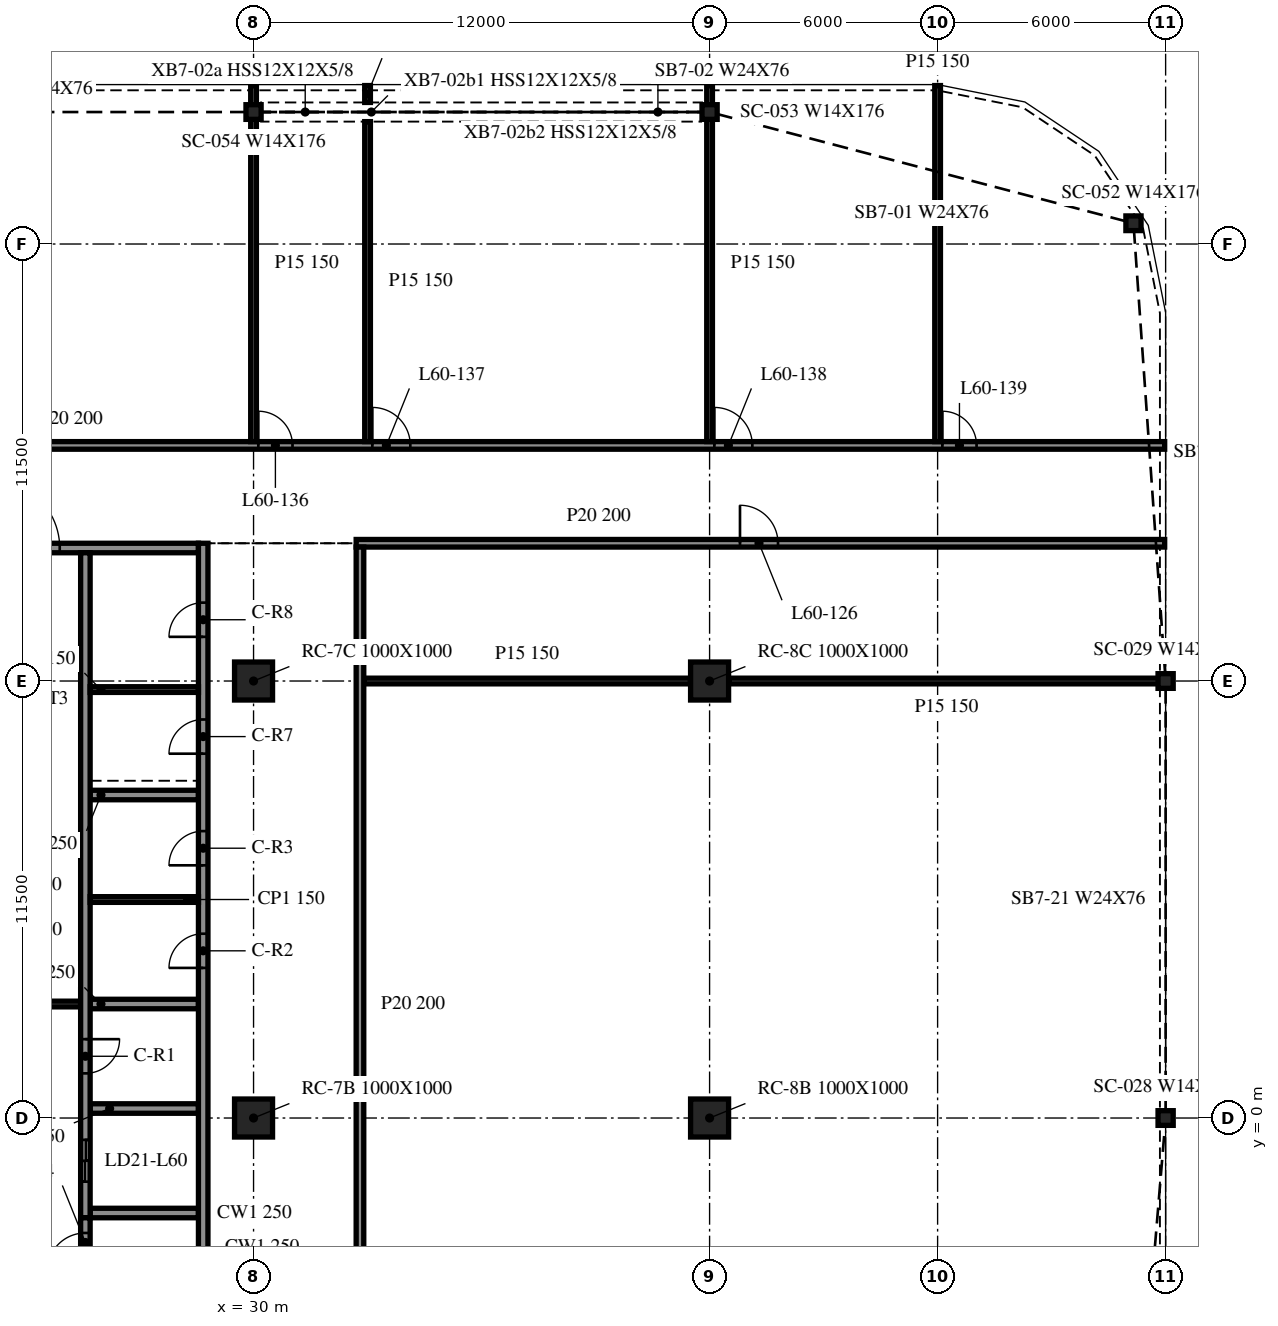
"""IFC4 building model, lengths in metres.
Left out: names, types, materials, properties, quantities, classifications, styles, units other than length and angle.
Written with IfcOpenShell. Run it as: python <this file> out.ifc"""

import sys

from ifc_helpers import new_model, si_unit, direction, frame, frame_2d, origin, origin_2d, place, context, subcontext, project, spatial, rectangle, i_section, extrude, element, fill, save


model = new_model("IFC4")
c1 = context("Model", 3, precision=1e-05, world=origin(), true_north=direction((0.0, 1.0)))
c2 = subcontext(c1, "Body", "Model", "MODEL_VIEW")
j1 = project(units=[si_unit("LENGTHUNIT", "METRE"), si_unit("PLANEANGLEUNIT", "RADIAN")], contexts=[c1])
p1 = place(None, origin())
s1 = spatial("IfcSite", under=j1, at=p1, CompositionType="ELEMENT")
p2 = place(p1, origin())
s2 = spatial("IfcBuilding", under=s1, at=p2, CompositionType="ELEMENT")
p3 = place(p2, frame((0.0, 0.0, 247.6)))
s3 = spatial("IfcBuildingStorey", under=s2, at=p3, CompositionType="ELEMENT", Elevation=247.6)
for number, where, z_axis, x_axis in (
    (1, (30.0, 0.0, -0.34), (0.0, 0.0, 1.0), (1.0, 0.0, 0.0)),
    (2, (30.0, 11.5, -0.34), (0.0, 0.0, 1.0), (1.0, 0.0, 0.0)),
    (3, (42.0, 0.0, -0.34), (0.0, 0.0, 1.0), (1.0, 0.0, 0.0)),
    (4, (42.0, 11.5, -0.34), (0.0, 0.0, 1.0), (1.0, 0.0, 0.0)),
):
    element("IfcColumn", number, at=place(p3, frame(where, z_axis=z_axis, x_axis=x_axis)), inside=s3, PredefinedType="COLUMN", context=c2, shape_type="SweptSolid", body=[
        extrude(rectangle(XDim=1.0, YDim=1.0, at=origin_2d()), origin(), (0.0, 0.0, 1.0), 3.8),
    ])
for number, where, z_axis, x_axis in (
    (5, (53.154, 23.546, -0.34), (0.0, 0.0, 1.0), (1.0, 0.0, 0.0)),
    (6, (42.0, 26.473, -0.34), (0.0, 0.0, 1.0), (1.0, 0.0, 0.0)),
    (7, (30.0, 26.473, -0.34), (0.0, 0.0, 1.0), (1.0, 0.0, 0.0)),
    (8, (54.0, 0.0, -0.34), (0.0, 0.0, 1.0), (1.0, 0.0, 0.0)),
    (9, (54.0, 11.5, -0.34), (0.0, 0.0, 1.0), (1.0, 0.0, 0.0)),
):
    element("IfcColumn", number, at=place(p3, frame(where, z_axis=z_axis, x_axis=x_axis)), inside=s3, PredefinedType="COLUMN", context=c2, shape_type="SweptSolid", body=[
        extrude(i_section(OverallWidth=0.399, OverallDepth=0.386, WebThickness=0.021, FlangeThickness=0.033, at=origin_2d()), origin(), (0.0, 0.0, 1.0), 3.8),
    ])
p4 = place(p3, frame((28.675, -9.125, 0.0), z_axis=(0.0, 0.0, 1.0), x_axis=(0.0, 1.0, 0.0)))
e10 = element("IfcWall", 10, at=p4, inside=s3, PredefinedType="SOLIDWALL", context=c2, shape_type="SweptSolid", body=[
    extrude(rectangle(XDim=24.25, YDim=0.25, at=frame_2d((12.125, 0.0))), origin(), (0.0, 0.0, 1.0), 3.46),
])
p5 = place(p4, frame((13.075, 0.0, 0.0)))
e11 = element("IfcOpeningElement", 11, at=p5, cuts=e10, PredefinedType="OPENING", context=c2, shape_type="SweptSolid", body=[
    extrude(rectangle(XDim=0.9, YDim=2.1, at=frame_2d((0.45, 1.05))), frame((0.0, 0.135, 0.0), z_axis=(0.0, -1.0, 0.0), x_axis=(1.0, 0.0, 0.0)), (0.0, 0.0, 1.0), 0.27),
])
p6 = place(p4, frame((15.775, 0.0, 0.0)))
e12 = element("IfcOpeningElement", 12, at=p6, cuts=e10, PredefinedType="OPENING", context=c2, shape_type="SweptSolid", body=[
    extrude(rectangle(XDim=0.9, YDim=2.1, at=frame_2d((0.45, 1.05))), frame((0.0, 0.135, 0.0), z_axis=(0.0, -1.0, 0.0), x_axis=(1.0, 0.0, 0.0)), (0.0, 0.0, 1.0), 0.27),
])
p7 = place(p4, frame((18.712, 0.0, 0.0)))
e13 = element("IfcOpeningElement", 13, at=p7, cuts=e10, PredefinedType="OPENING", context=c2, shape_type="SweptSolid", body=[
    extrude(rectangle(XDim=0.9, YDim=2.1, at=frame_2d((0.45, 1.05))), frame((0.0, 0.135, 0.0), z_axis=(0.0, -1.0, 0.0), x_axis=(1.0, 0.0, 0.0)), (0.0, 0.0, 1.0), 0.27),
])
p8 = place(p4, frame((21.788, 0.0, 0.0)))
e14 = element("IfcOpeningElement", 14, at=p8, cuts=e10, PredefinedType="OPENING", context=c2, shape_type="SweptSolid", body=[
    extrude(rectangle(XDim=0.9, YDim=2.1, at=frame_2d((0.45, 1.05))), frame((0.0, 0.135, 0.0), z_axis=(0.0, -1.0, 0.0), x_axis=(1.0, 0.0, 0.0)), (0.0, 0.0, 1.0), 0.27),
])
p9 = place(p3, frame((19.45, 15.0, 0.0), z_axis=(0.0, 0.0, 1.0), x_axis=(1.0, 0.0, 0.0)))
e15 = element("IfcWall", 15, at=p9, inside=s3, PredefinedType="SOLIDWALL", context=c2, shape_type="SweptSolid", body=[
    extrude(rectangle(XDim=9.1, YDim=0.25, at=frame_2d((4.55, 0.0))), origin(), (0.0, 0.0, 1.0), 3.46),
])
p10 = place(p9, frame((3.65, 0.0, 0.0)))
e16 = element("IfcOpeningElement", 16, at=p10, cuts=e15, PredefinedType="OPENING", context=c2, shape_type="SweptSolid", body=[
    extrude(rectangle(XDim=1.8, YDim=2.1, at=frame_2d((0.9, 1.05))), frame((0.0, 0.135, 0.0), z_axis=(0.0, -1.0, 0.0), x_axis=(1.0, 0.0, 0.0)), (0.0, 0.0, 1.0), 0.27),
])
p11 = place(p3, frame((25.575, -8.875, 0.0), z_axis=(0.0, 0.0, 1.0), x_axis=(0.0, 1.0, 0.0)))
e17 = element("IfcWall", 17, at=p11, inside=s3, PredefinedType="SOLIDWALL", context=c2, shape_type="SweptSolid", body=[
    extrude(rectangle(XDim=6.25, YDim=0.25, at=frame_2d((3.125, 0.0))), origin(), (0.0, 0.0, 1.0), 3.46),
])
p12 = place(p11, frame((4.85, 0.0, 0.0)))
e18 = element("IfcOpeningElement", 18, at=p12, cuts=e17, PredefinedType="OPENING", context=c2, shape_type="SweptSolid", body=[
    extrude(rectangle(XDim=1.0, YDim=2.1, at=frame_2d((0.5, 1.05))), frame((0.0, 0.135, 0.0), z_axis=(0.0, -1.0, 0.0), x_axis=(1.0, 0.0, 0.0)), (0.0, 0.0, 1.0), 0.27),
])
p13 = place(p3, frame((25.575, 14.875, 0.0), z_axis=(0.0, 0.0, 1.0), x_axis=(0.0, -1.0, 0.0)))
e19 = element("IfcWall", 19, at=p13, inside=s3, PredefinedType="SOLIDWALL", context=c2, shape_type="SweptSolid", body=[
    extrude(rectangle(XDim=17.5, YDim=0.25, at=frame_2d((8.75, 0.0))), origin(), (0.0, 0.0, 1.0), 3.46),
])
p14 = place(p13, frame((15.45, 0.0, 0.0)))
e20 = element("IfcOpeningElement", 20, at=p14, cuts=e19, PredefinedType="OPENING", context=c2, shape_type="SweptSolid", body=[
    extrude(rectangle(XDim=1.1, YDim=2.1, at=frame_2d((0.55, 1.05))), frame((0.0, 0.135, 0.0), z_axis=(0.0, -1.0, 0.0), x_axis=(1.0, 0.0, 0.0)), (0.0, 0.0, 1.0), 0.27),
])
p15 = place(p13, frame((12.8, 0.0, 0.0)))
e21 = element("IfcOpeningElement", 21, at=p15, cuts=e19, PredefinedType="OPENING", context=c2, shape_type="SweptSolid", body=[
    extrude(rectangle(XDim=0.9, YDim=2.1, at=frame_2d((0.45, 1.05))), frame((0.0, 0.135, 0.0), z_axis=(0.0, -1.0, 0.0), x_axis=(1.0, 0.0, 0.0)), (0.0, 0.0, 1.0), 0.27),
])
for number, where, z_axis, x_axis in (
    (22, (25.7, -2.5, 0.0), (0.0, 0.0, 1.0), (1.0, 0.0, 0.0)),
    (23, (25.7, 0.25, 0.0), (0.0, 0.0, 1.0), (1.0, 0.0, 0.0)),
    (24, (25.7, 3.0, 0.0), (0.0, 0.0, 1.0), (1.0, 0.0, 0.0)),
    (25, (25.7, 8.5, 0.0), (0.0, 0.0, 1.0), (1.0, 0.0, 0.0)),
):
    element("IfcWall", number, at=place(p3, frame(where, z_axis=z_axis, x_axis=x_axis)), inside=s3, PredefinedType="SOLIDWALL", context=c2, shape_type="SweptSolid", body=[
        extrude(rectangle(XDim=2.85, YDim=0.25, at=frame_2d((1.425, 0.0))), origin(), (0.0, 0.0, 1.0), 3.46),
    ])
p16 = place(p3, frame((22.55, 3.0, 0.0), z_axis=(0.0, 0.0, 1.0), x_axis=(1.0, 0.0, 0.0)))
e26 = element("IfcWall", 26, at=p16, inside=s3, PredefinedType="PARTITIONING", context=c2, shape_type="SweptSolid", body=[
    extrude(rectangle(XDim=2.9, YDim=0.15, at=frame_2d((1.45, 0.0))), origin(), (0.0, 0.0, 1.0), 3.46),
])
for number, where, z_axis, x_axis in (
    (27, (25.7, 5.75, 0.0), (0.0, 0.0, 1.0), (1.0, 0.0, 0.0)),
    (28, (25.7, 11.275, 0.0), (0.0, 0.0, 1.0), (1.0, 0.0, 0.0)),
):
    element("IfcWall", number, at=place(p3, frame(where, z_axis=z_axis, x_axis=x_axis)), inside=s3, PredefinedType="PARTITIONING", context=c2, shape_type="SweptSolid", body=[
        extrude(rectangle(XDim=2.85, YDim=0.15, at=frame_2d((1.425, 0.0))), origin(), (0.0, 0.0, 1.0), 3.46),
    ])
p17 = place(p3, frame((32.9, 11.5, 0.0), z_axis=(0.0, 0.0, 1.0), x_axis=(1.0, 0.0, 0.0)))
e29 = element("IfcWall", 29, at=p17, inside=s3, PredefinedType="PARTITIONING", context=c2, shape_type="SweptSolid", body=[
    extrude(rectangle(XDim=8.6, YDim=0.15, at=frame_2d((4.3, 0.0))), origin(), (0.0, 0.0, 1.0), 3.46),
])
p18 = place(p3, frame((42.5, 11.5, 0.0), z_axis=(0.0, 0.0, 1.0), x_axis=(1.0, 0.0, 0.0)))
e30 = element("IfcWall", 30, at=p18, inside=s3, PredefinedType="PARTITIONING", context=c2, shape_type="SweptSolid", body=[
    extrude(rectangle(XDim=11.475, YDim=0.15, at=frame_2d((5.738, 0.0))), origin(), (0.0, 0.0, 1.0), 3.46),
])
p19 = place(p3, frame((32.7, 15.125, 0.0), z_axis=(0.0, 0.0, 1.0), x_axis=(1.0, 0.0, 0.0)))
e31 = element("IfcWall", 31, at=p19, inside=s3, PredefinedType="PARTITIONING", context=c2, shape_type="SweptSolid", body=[
    extrude(rectangle(XDim=21.275, YDim=0.2, at=frame_2d((10.638, 0.0))), origin(), (0.0, 0.0, 1.0), 3.46),
])
p20 = place(p19, frame((10.1, 0.0, 0.0)))
e32 = element("IfcOpeningElement", 32, at=p20, cuts=e31, PredefinedType="OPENING", context=c2, shape_type="SweptSolid", body=[
    extrude(rectangle(XDim=1.0, YDim=2.1, at=frame_2d((0.5, 1.05))), frame((0.0, 0.11, 0.0), z_axis=(0.0, -1.0, 0.0), x_axis=(1.0, 0.0, 0.0)), (0.0, 0.0, 1.0), 0.22),
])
p21 = place(p3, frame((-41.975, 17.7, 0.0), z_axis=(0.0, 0.0, 1.0), x_axis=(1.0, 0.0, 0.0)))
e33 = element("IfcWall", 33, at=p21, inside=s3, PredefinedType="PARTITIONING", context=c2, shape_type="SweptSolid", body=[
    extrude(rectangle(XDim=95.95, YDim=0.2, at=frame_2d((47.975, 0.0))), origin(), (0.0, 0.0, 1.0), 3.46),
])
p22 = place(p21, frame((10.7, 0.0, 0.0)))
e34 = element("IfcOpeningElement", 34, at=p22, cuts=e33, PredefinedType="OPENING", context=c2, shape_type="SweptSolid", body=[
    extrude(rectangle(XDim=0.9, YDim=2.1, at=frame_2d((0.45, 1.05))), frame((0.0, 0.11, 0.0), z_axis=(0.0, -1.0, 0.0), x_axis=(1.0, 0.0, 0.0)), (0.0, 0.0, 1.0), 0.22),
])
p23 = place(p21, frame((13.5, 0.0, 0.0)))
e35 = element("IfcOpeningElement", 35, at=p23, cuts=e33, PredefinedType="OPENING", context=c2, shape_type="SweptSolid", body=[
    extrude(rectangle(XDim=1.0, YDim=2.1, at=frame_2d((0.5, 1.05))), frame((0.0, 0.11, 0.0), z_axis=(0.0, -1.0, 0.0), x_axis=(1.0, 0.0, 0.0)), (0.0, 0.0, 1.0), 0.22),
])
p24 = place(p21, frame((22.7, 0.0, 0.0)))
e36 = element("IfcOpeningElement", 36, at=p24, cuts=e33, PredefinedType="OPENING", context=c2, shape_type="SweptSolid", body=[
    extrude(rectangle(XDim=0.9, YDim=2.1, at=frame_2d((0.45, 1.05))), frame((0.0, 0.11, 0.0), z_axis=(0.0, -1.0, 0.0), x_axis=(1.0, 0.0, 0.0)), (0.0, 0.0, 1.0), 0.22),
])
p25 = place(p21, frame((28.7, 0.0, 0.0)))
e37 = element("IfcOpeningElement", 37, at=p25, cuts=e33, PredefinedType="OPENING", context=c2, shape_type="SweptSolid", body=[
    extrude(rectangle(XDim=0.9, YDim=2.1, at=frame_2d((0.45, 1.05))), frame((0.0, 0.11, 0.0), z_axis=(0.0, -1.0, 0.0), x_axis=(1.0, 0.0, 0.0)), (0.0, 0.0, 1.0), 0.22),
])
p26 = place(p21, frame((40.5, 0.0, 0.0)))
e38 = element("IfcOpeningElement", 38, at=p26, cuts=e33, PredefinedType="OPENING", context=c2, shape_type="SweptSolid", body=[
    extrude(rectangle(XDim=1.0, YDim=2.1, at=frame_2d((0.5, 1.05))), frame((0.0, 0.11, 0.0), z_axis=(0.0, -1.0, 0.0), x_axis=(1.0, 0.0, 0.0)), (0.0, 0.0, 1.0), 0.22),
])
p27 = place(p21, frame((43.5, 0.0, 0.0)))
e39 = element("IfcOpeningElement", 39, at=p27, cuts=e33, PredefinedType="OPENING", context=c2, shape_type="SweptSolid", body=[
    extrude(rectangle(XDim=1.0, YDim=2.1, at=frame_2d((0.5, 1.05))), frame((0.0, 0.11, 0.0), z_axis=(0.0, -1.0, 0.0), x_axis=(1.0, 0.0, 0.0)), (0.0, 0.0, 1.0), 0.22),
])
p28 = place(p21, frame((47.3, 0.0, 0.0)))
e40 = element("IfcOpeningElement", 40, at=p28, cuts=e33, PredefinedType="OPENING", context=c2, shape_type="SweptSolid", body=[
    extrude(rectangle(XDim=0.9, YDim=2.1, at=frame_2d((0.45, 1.05))), frame((0.0, 0.11, 0.0), z_axis=(0.0, -1.0, 0.0), x_axis=(1.0, 0.0, 0.0)), (0.0, 0.0, 1.0), 0.22),
])
p29 = place(p21, frame((54.1, 0.0, 0.0)))
e41 = element("IfcOpeningElement", 41, at=p29, cuts=e33, PredefinedType="OPENING", context=c2, shape_type="SweptSolid", body=[
    extrude(rectangle(XDim=1.0, YDim=2.1, at=frame_2d((0.5, 1.05))), frame((0.0, 0.11, 0.0), z_axis=(0.0, -1.0, 0.0), x_axis=(1.0, 0.0, 0.0)), (0.0, 0.0, 1.0), 0.22),
])
p30 = place(p21, frame((60.1, 0.0, 0.0)))
e42 = element("IfcOpeningElement", 42, at=p30, cuts=e33, PredefinedType="OPENING", context=c2, shape_type="SweptSolid", body=[
    extrude(rectangle(XDim=0.9, YDim=2.1, at=frame_2d((0.45, 1.05))), frame((0.0, 0.11, 0.0), z_axis=(0.0, -1.0, 0.0), x_axis=(1.0, 0.0, 0.0)), (0.0, 0.0, 1.0), 0.22),
])
p31 = place(p21, frame((72.1, 0.0, 0.0)))
e43 = element("IfcOpeningElement", 43, at=p31, cuts=e33, PredefinedType="OPENING", context=c2, shape_type="SweptSolid", body=[
    extrude(rectangle(XDim=0.9, YDim=2.1, at=frame_2d((0.45, 1.05))), frame((0.0, 0.11, 0.0), z_axis=(0.0, -1.0, 0.0), x_axis=(1.0, 0.0, 0.0)), (0.0, 0.0, 1.0), 0.22),
])
p32 = place(p21, frame((75.1, 0.0, 0.0)))
e44 = element("IfcOpeningElement", 44, at=p32, cuts=e33, PredefinedType="OPENING", context=c2, shape_type="SweptSolid", body=[
    extrude(rectangle(XDim=1.0, YDim=2.1, at=frame_2d((0.5, 1.05))), frame((0.0, 0.11, 0.0), z_axis=(0.0, -1.0, 0.0), x_axis=(1.0, 0.0, 0.0)), (0.0, 0.0, 1.0), 0.22),
])
p33 = place(p21, frame((84.1, 0.0, 0.0)))
e45 = element("IfcOpeningElement", 45, at=p33, cuts=e33, PredefinedType="OPENING", context=c2, shape_type="SweptSolid", body=[
    extrude(rectangle(XDim=1.0, YDim=2.1, at=frame_2d((0.5, 1.05))), frame((0.0, 0.11, 0.0), z_axis=(0.0, -1.0, 0.0), x_axis=(1.0, 0.0, 0.0)), (0.0, 0.0, 1.0), 0.22),
])
p34 = place(p21, frame((90.1, 0.0, 0.0)))
e46 = element("IfcOpeningElement", 46, at=p34, cuts=e33, PredefinedType="OPENING", context=c2, shape_type="SweptSolid", body=[
    extrude(rectangle(XDim=0.9, YDim=2.1, at=frame_2d((0.45, 1.05))), frame((0.0, 0.11, 0.0), z_axis=(0.0, -1.0, 0.0), x_axis=(1.0, 0.0, 0.0)), (0.0, 0.0, 1.0), 0.22),
])
p35 = place(p3, frame((30.0, 17.8, 0.0), z_axis=(0.0, 0.0, 1.0), x_axis=(0.0, 1.0, 0.0)))
e47 = element("IfcWall", 47, at=p35, inside=s3, PredefinedType="PARTITIONING", context=c2, shape_type="SweptSolid", body=[
    extrude(rectangle(XDim=9.37, YDim=0.15, at=frame_2d((4.685, 0.0))), origin(), (0.0, 0.0, 1.0), 3.46),
])
p36 = place(p3, frame((32.8, -9.025, 0.0), z_axis=(0.0, 0.0, 1.0), x_axis=(0.0, 1.0, 0.0)))
e48 = element("IfcWall", 48, at=p36, inside=s3, PredefinedType="PARTITIONING", context=c2, shape_type="SweptSolid", body=[
    extrude(rectangle(XDim=24.05, YDim=0.2, at=frame_2d((12.025, 0.0))), origin(), (0.0, 0.0, 1.0), 3.46),
])
p37 = place(p3, frame((33.0, 17.8, 0.0), z_axis=(0.0, 0.0, 1.0), x_axis=(0.0, 1.0, 0.0)))
e49 = element("IfcWall", 49, at=p37, inside=s3, PredefinedType="PARTITIONING", context=c2, shape_type="SweptSolid", body=[
    extrude(rectangle(XDim=8.421, YDim=0.15, at=frame_2d((4.21, 0.0))), origin(), (0.0, 0.0, 1.0), 3.46),
])
p38 = place(p3, frame((33.0, 26.725, 0.0), z_axis=(0.0, 0.0, 1.0), x_axis=(0.0, 1.0, 0.0)))
e50 = element("IfcWall", 50, at=p38, inside=s3, PredefinedType="PARTITIONING", context=c2, shape_type="SweptSolid", body=[
    extrude(rectangle(XDim=0.445, YDim=0.15, at=frame_2d((0.222, 0.0))), origin(), (0.0, 0.0, 1.0), 3.46),
])
for number, where, z_axis, x_axis in (
    (51, (42.0, 17.8, 0.0), (0.0, 0.0, 1.0), (0.0, 1.0, 0.0)),
    (52, (48.0, 17.8, 0.0), (0.0, 0.0, 1.0), (0.0, 1.0, 0.0)),
):
    element("IfcWall", number, at=place(p3, frame(where, z_axis=z_axis, x_axis=x_axis)), inside=s3, PredefinedType="PARTITIONING", context=c2, shape_type="SweptSolid", body=[
        extrude(rectangle(XDim=9.37, YDim=0.15, at=frame_2d((4.685, 0.0))), origin(), (0.0, 0.0, 1.0), 3.46),
    ])
p39 = place(p10, origin())
e53 = element("IfcDoor", 53, at=p39, inside=s3, OperationType="DOUBLE_DOOR_SINGLE_SWING", PredefinedType="DOOR", context=c2, shape_type="SweptSolid", body=[
    extrude(rectangle(XDim=1.8, YDim=2.1, at=frame_2d((0.9, 1.05))), frame((0.0, 0.025, 0.0), z_axis=(0.0, -1.0, 0.0), x_axis=(1.0, 0.0, 0.0)), (0.0, 0.0, 1.0), 0.05),
])
fill(e16, e53)
p40 = place(p14, origin())
e54 = element("IfcDoor", 54, at=p40, inside=s3, OperationType="DOUBLE_DOOR_SLIDING", PredefinedType="DOOR", context=c2, shape_type="SweptSolid", body=[
    extrude(rectangle(XDim=1.1, YDim=2.1, at=frame_2d((0.55, 1.05))), frame((0.0, 0.025, 0.0), z_axis=(0.0, -1.0, 0.0), x_axis=(1.0, 0.0, 0.0)), (0.0, 0.0, 1.0), 0.05),
])
fill(e20, e54)
p41 = place(p15, origin())
e55 = element("IfcDoor", 55, at=p41, inside=s3, OperationType="SINGLE_SWING_LEFT", PredefinedType="DOOR", context=c2, shape_type="SweptSolid", body=[
    extrude(rectangle(XDim=0.9, YDim=2.1, at=frame_2d((0.45, 1.05))), frame((0.0, 0.025, 0.0), z_axis=(0.0, -1.0, 0.0), x_axis=(1.0, 0.0, 0.0)), (0.0, 0.0, 1.0), 0.05),
])
fill(e21, e55)
p42 = place(p5, origin())
e56 = element("IfcDoor", 56, at=p42, inside=s3, OperationType="SINGLE_SWING_RIGHT", PredefinedType="DOOR", context=c2, shape_type="SweptSolid", body=[
    extrude(rectangle(XDim=0.9, YDim=2.1, at=frame_2d((0.45, 1.05))), frame((0.0, 0.025, 0.0), z_axis=(0.0, -1.0, 0.0), x_axis=(1.0, 0.0, 0.0)), (0.0, 0.0, 1.0), 0.05),
])
fill(e11, e56)
p43 = place(p6, origin())
e57 = element("IfcDoor", 57, at=p43, inside=s3, OperationType="SINGLE_SWING_LEFT", PredefinedType="DOOR", context=c2, shape_type="SweptSolid", body=[
    extrude(rectangle(XDim=0.9, YDim=2.1, at=frame_2d((0.45, 1.05))), frame((0.0, 0.025, 0.0), z_axis=(0.0, -1.0, 0.0), x_axis=(1.0, 0.0, 0.0)), (0.0, 0.0, 1.0), 0.05),
])
fill(e12, e57)
p44 = place(p7, origin())
e58 = element("IfcDoor", 58, at=p44, inside=s3, OperationType="SINGLE_SWING_LEFT", PredefinedType="DOOR", context=c2, shape_type="SweptSolid", body=[
    extrude(rectangle(XDim=0.9, YDim=2.1, at=frame_2d((0.45, 1.05))), frame((0.0, 0.025, 0.0), z_axis=(0.0, -1.0, 0.0), x_axis=(1.0, 0.0, 0.0)), (0.0, 0.0, 1.0), 0.05),
])
fill(e13, e58)
p45 = place(p8, origin())
e59 = element("IfcDoor", 59, at=p45, inside=s3, OperationType="SINGLE_SWING_RIGHT", PredefinedType="DOOR", context=c2, shape_type="SweptSolid", body=[
    extrude(rectangle(XDim=0.9, YDim=2.1, at=frame_2d((0.45, 1.05))), frame((0.0, 0.025, 0.0), z_axis=(0.0, -1.0, 0.0), x_axis=(1.0, 0.0, 0.0)), (0.0, 0.0, 1.0), 0.05),
])
fill(e14, e59)
p46 = place(p12, origin())
e60 = element("IfcDoor", 60, at=p46, inside=s3, OperationType="SINGLE_SWING_RIGHT", PredefinedType="DOOR", context=c2, shape_type="SweptSolid", body=[
    extrude(rectangle(XDim=1.0, YDim=2.1, at=frame_2d((0.5, 1.05))), frame((0.0, 0.025, 0.0), z_axis=(0.0, -1.0, 0.0), x_axis=(1.0, 0.0, 0.0)), (0.0, 0.0, 1.0), 0.05),
])
fill(e18, e60)
p47 = place(p20, origin())
e61 = element("IfcDoor", 61, at=p47, inside=s3, OperationType="SINGLE_SWING_LEFT", PredefinedType="DOOR", context=c2, shape_type="SweptSolid", body=[
    extrude(rectangle(XDim=1.0, YDim=2.1, at=frame_2d((0.5, 1.05))), frame((0.0, 0.025, 0.0), z_axis=(0.0, -1.0, 0.0), x_axis=(1.0, 0.0, 0.0)), (0.0, 0.0, 1.0), 0.05),
])
fill(e32, e61)
p48 = place(p31, origin())
e62 = element("IfcDoor", 62, at=p48, inside=s3, OperationType="SINGLE_SWING_RIGHT", PredefinedType="DOOR", context=c2, shape_type="SweptSolid", body=[
    extrude(rectangle(XDim=0.9, YDim=2.1, at=frame_2d((0.45, 1.05))), frame((0.0, 0.025, 0.0), z_axis=(0.0, -1.0, 0.0), x_axis=(1.0, 0.0, 0.0)), (0.0, 0.0, 1.0), 0.05),
])
fill(e43, e62)
p49 = place(p32, origin())
e63 = element("IfcDoor", 63, at=p49, inside=s3, OperationType="SINGLE_SWING_RIGHT", PredefinedType="DOOR", context=c2, shape_type="SweptSolid", body=[
    extrude(rectangle(XDim=1.0, YDim=2.1, at=frame_2d((0.5, 1.05))), frame((0.0, 0.025, 0.0), z_axis=(0.0, -1.0, 0.0), x_axis=(1.0, 0.0, 0.0)), (0.0, 0.0, 1.0), 0.05),
])
fill(e44, e63)
p50 = place(p33, origin())
e64 = element("IfcDoor", 64, at=p50, inside=s3, OperationType="SINGLE_SWING_RIGHT", PredefinedType="DOOR", context=c2, shape_type="SweptSolid", body=[
    extrude(rectangle(XDim=1.0, YDim=2.1, at=frame_2d((0.5, 1.05))), frame((0.0, 0.025, 0.0), z_axis=(0.0, -1.0, 0.0), x_axis=(1.0, 0.0, 0.0)), (0.0, 0.0, 1.0), 0.05),
])
fill(e45, e64)
p51 = place(p34, origin())
e65 = element("IfcDoor", 65, at=p51, inside=s3, OperationType="SINGLE_SWING_RIGHT", PredefinedType="DOOR", context=c2, shape_type="SweptSolid", body=[
    extrude(rectangle(XDim=0.9, YDim=2.1, at=frame_2d((0.45, 1.05))), frame((0.0, 0.025, 0.0), z_axis=(0.0, -1.0, 0.0), x_axis=(1.0, 0.0, 0.0)), (0.0, 0.0, 1.0), 0.05),
])
fill(e46, e65)
save(model, sys.argv[1])
